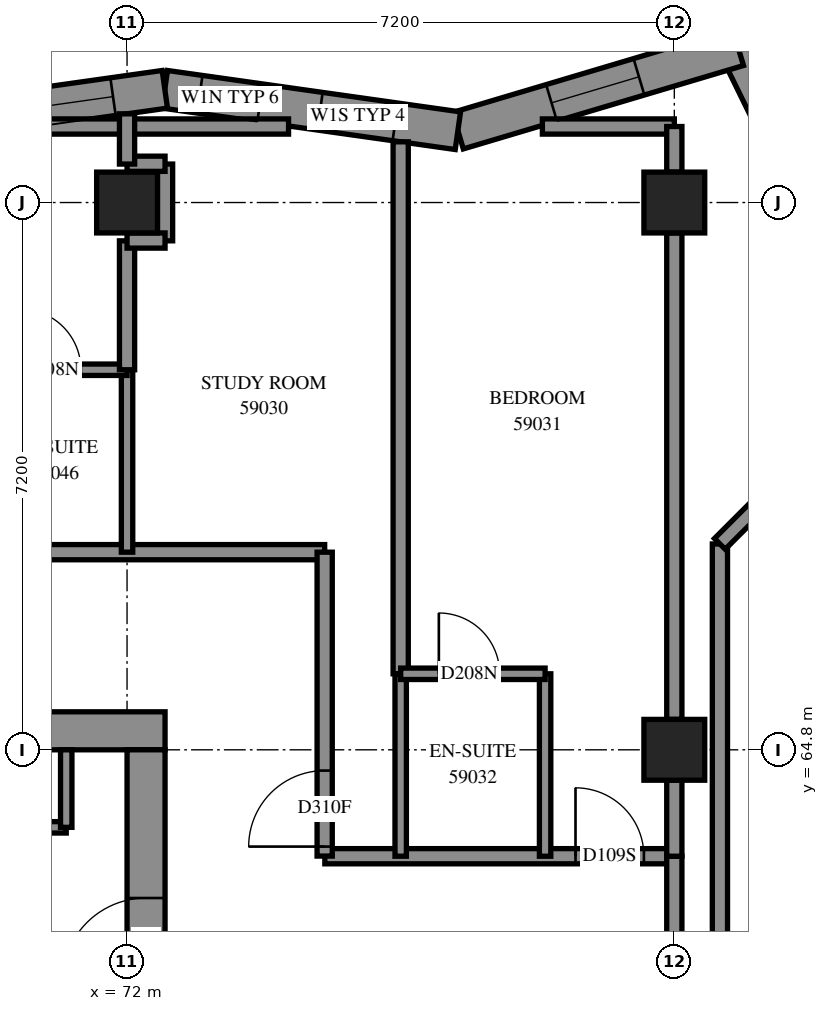
"""IFC4 building model, lengths in metres.
Left out: names, types, materials, properties, quantities, classifications, styles, units other than length and angle.
Written with IfcOpenShell. Run it as: python <this file> out.ifc"""

import sys

from ifc_helpers import new_model, si_unit, direction, frame, frame_2d, origin, origin_2d, place, context, subcontext, project, spatial, polyline, rectangle, outline, extrude, element, fill, save


model = new_model("IFC4")
c1 = context("Model", 3, precision=1e-05, world=origin(), true_north=direction((0.0, 1.0)))
c2 = subcontext(c1, "Body", "Model", "MODEL_VIEW")
j1 = project(units=[si_unit("LENGTHUNIT", "METRE"), si_unit("PLANEANGLEUNIT", "RADIAN")], contexts=[c1])
p1 = place(None, origin())
s1 = spatial("IfcSite", under=j1, at=p1, CompositionType="ELEMENT")
p2 = place(p1, origin())
s2 = spatial("IfcBuilding", under=s1, at=p2, CompositionType="ELEMENT")
p3 = place(p2, frame((0.0, 0.0, 216.8)))
s3 = spatial("IfcBuildingStorey", under=s2, at=p3, CompositionType="ELEMENT", Elevation=216.8)
for number, where, z_axis, x_axis in (
    (1, (72.0, 72.0, 0.0), (0.0, 0.0, 1.0), (1.0, 0.0, 0.0)),
    (2, (79.2, 64.8, 0.0), (0.0, 0.0, 1.0), (1.0, 0.0, 0.0)),
    (3, (79.2, 72.0, 0.0), (0.0, 0.0, 1.0), (1.0, 0.0, 0.0)),
):
    element("IfcColumn", number, at=place(p3, frame(where, z_axis=z_axis, x_axis=x_axis)), inside=s3, PredefinedType="COLUMN", context=c2, shape_type="SweptSolid", body=[
        extrude(rectangle(XDim=0.8, YDim=0.8, at=origin_2d()), origin(), (0.0, 0.0, 1.0), 3.1),
    ])
p4 = place(p3, frame((57.1, 65.05, -0.3), z_axis=(0.0, 0.0, 1.0), x_axis=(1.0, 0.0, 0.0)))
e4 = element("IfcWall", 4, at=p4, inside=s3, PredefinedType="SHEAR", context=c2, shape_type="SweptSolid", body=[
    extrude(rectangle(XDim=15.4, YDim=0.5, at=frame_2d((7.7, 0.0))), origin(), (0.0, 0.0, 1.0), 2.7),
])
p5 = place(p4, frame((10.5, 0.0, 0.3)))
e5 = element("IfcOpeningElement", 5, at=p5, cuts=e4, PredefinedType="OPENING", context=c2, shape_type="SweptSolid", body=[
    extrude(rectangle(XDim=0.8, YDim=2.1, at=frame_2d((0.4, 1.05))), frame((0.0, 0.26, 0.0), z_axis=(0.0, -1.0, 0.0), x_axis=(1.0, 0.0, 0.0)), (0.0, 0.0, 1.0), 0.52),
])
p6 = place(p3, frame((72.25, 50.4, -0.3), z_axis=(0.0, 0.0, 1.0), x_axis=(0.0, 1.0, 0.0)))
e6 = element("IfcWall", 6, at=p6, inside=s3, PredefinedType="SHEAR", context=c2, shape_type="SweptSolid", body=[
    extrude(rectangle(XDim=14.4, YDim=0.5, at=frame_2d((7.2, 0.0))), origin(), (0.0, 0.0, 1.0), 2.7),
])
p7 = place(p6, frame((4.55, 0.0, 0.3)))
e7 = element("IfcOpeningElement", 7, at=p7, cuts=e6, PredefinedType="OPENING", context=c2, shape_type="SweptSolid", body=[
    extrude(rectangle(XDim=1.1, YDim=2.1, at=frame_2d((0.55, 1.05))), frame((0.0, 0.26, 0.0), z_axis=(0.0, -1.0, 0.0), x_axis=(1.0, 0.0, 0.0)), (0.0, 0.0, 1.0), 0.52),
])
p8 = place(p6, frame((11.35, 0.0, 0.3)))
e8 = element("IfcOpeningElement", 8, at=p8, cuts=e6, PredefinedType="OPENING", context=c2, shape_type="SweptSolid", body=[
    extrude(rectangle(XDim=1.1, YDim=2.1, at=frame_2d((0.55, 1.05))), frame((0.0, 0.26, 0.0), z_axis=(0.0, -1.0, 0.0), x_axis=(1.0, 0.0, 0.0)), (0.0, 0.0, 1.0), 0.52),
])
p9 = place(p3, frame((81.525, 71.009, 0.0), z_axis=(0.0, 0.0, 1.0), x_axis=(-0.4400711052, 0.8979629293, 0.0)))
e9 = element("IfcWall", 9, at=p9, inside=s3, PredefinedType="SOLIDWALL", context=c2, shape_type="SweptSolid", body=[
    extrude(outline(polyline([(0.063, -0.25), (3.59, -0.25), (3.167, 0.25), (-0.063, 0.25), (0.063, -0.25)])), origin(), (0.0, 0.0, 1.0), 3.1),
])
p10 = place(p9, frame((0.739, 0.0, 0.45)))
e10 = element("IfcOpeningElement", 10, at=p10, cuts=e9, PredefinedType="OPENING", context=c2, shape_type="SweptSolid", body=[
    extrude(rectangle(XDim=1.2, YDim=2.5, at=frame_2d((0.6, 1.25))), frame((0.0, 0.26, 0.0), z_axis=(0.0, -1.0, 0.0), x_axis=(1.0, 0.0, 0.0)), (0.0, 0.0, 1.0), 0.52),
])
p11 = place(p3, frame((80.039, 74.042, 0.0), z_axis=(0.0, 0.0, 1.0), x_axis=(-0.9584416684, -0.2852885702, 0.0)))
e11 = element("IfcWall", 11, at=p11, inside=s3, PredefinedType="SOLIDWALL", context=c2, shape_type="SweptSolid", body=[
    extrude(outline(polyline([(-0.211, -0.25), (3.791, -0.25), (3.901, 0.25), (0.211, 0.25), (-0.211, -0.25)])), origin(), (0.0, 0.0, 1.0), 3.1),
])
p12 = place(p11, frame((1.361, 0.0, 0.45)))
e12 = element("IfcOpeningElement", 12, at=p12, cuts=e11, PredefinedType="OPENING", context=c2, shape_type="SweptSolid", body=[
    extrude(rectangle(XDim=1.2, YDim=2.5, at=frame_2d((0.6, 1.25))), frame((0.0, 0.26, 0.0), z_axis=(0.0, -1.0, 0.0), x_axis=(1.0, 0.0, 0.0)), (0.0, 0.0, 1.0), 0.52),
])
p13 = place(p3, frame((76.353, 72.945, 0.0), z_axis=(0.0, 0.0, 1.0), x_axis=(-0.9901676214, 0.139885959, 0.0)))
e13 = element("IfcWall", 13, at=p13, inside=s3, PredefinedType="SOLIDWALL", context=c2, shape_type="SweptSolid", body=[
    extrude(outline(polyline([(0.054, -0.25), (3.929, -0.25), (3.859, 0.25), (-0.054, 0.25), (0.054, -0.25)])), origin(), (0.0, 0.0, 1.0), 3.1),
])
p14 = place(p13, frame((0.832, 0.0, 0.45)))
e14 = element("IfcOpeningElement", 14, at=p14, cuts=e13, PredefinedType="OPENING", context=c2, shape_type="SweptSolid", body=[
    extrude(rectangle(XDim=1.0, YDim=2.5, at=frame_2d((0.5, 1.25))), frame((0.0, 0.26, 0.0), z_axis=(0.0, -1.0, 0.0), x_axis=(1.0, 0.0, 0.0)), (0.0, 0.0, 1.0), 0.52),
])
p15 = place(p13, frame((2.629, 0.0, 0.45)))
e15 = element("IfcOpeningElement", 15, at=p15, cuts=e13, PredefinedType="OPENING", context=c2, shape_type="SweptSolid", body=[
    extrude(rectangle(XDim=0.8, YDim=2.5, at=frame_2d((0.4, 1.25))), frame((0.0, 0.26, 0.0), z_axis=(0.0, -1.0, 0.0), x_axis=(1.0, 0.0, 0.0)), (0.0, 0.0, 1.0), 0.52),
])
p16 = place(p3, frame((72.497, 73.49, 0.0), z_axis=(0.0, 0.0, 1.0), x_axis=(-0.9901681853, -0.1398819675, 0.0)))
e16 = element("IfcWall", 16, at=p16, inside=s3, PredefinedType="SOLIDWALL", context=c2, shape_type="SweptSolid", body=[
    extrude(outline(polyline([(-0.035, -0.25), (3.839, -0.25), (3.91, 0.25), (0.035, 0.25), (-0.035, -0.25)])), origin(), (0.0, 0.0, 1.0), 3.1),
])
p17 = place(p16, frame((0.688, 0.0, 0.45)))
e17 = element("IfcOpeningElement", 17, at=p17, cuts=e16, PredefinedType="OPENING", context=c2, shape_type="SweptSolid", body=[
    extrude(rectangle(XDim=1.3, YDim=2.5, at=frame_2d((0.65, 1.25))), frame((0.0, 0.26, 0.0), z_axis=(0.0, -1.0, 0.0), x_axis=(1.0, 0.0, 0.0)), (0.0, 0.0, 1.0), 0.52),
])
p18 = place(p16, frame((2.188, 0.0, 0.45)))
e18 = element("IfcOpeningElement", 18, at=p18, cuts=e16, PredefinedType="OPENING", context=c2, shape_type="SweptSolid", body=[
    extrude(rectangle(XDim=1.3, YDim=2.5, at=frame_2d((0.65, 1.25))), frame((0.0, 0.26, 0.0), z_axis=(0.0, -1.0, 0.0), x_axis=(1.0, 0.0, 0.0)), (0.0, 0.0, 1.0), 0.52),
])
p19 = place(p3, frame((64.95, 63.78, 0.0), z_axis=(0.0, 0.0, 1.0), x_axis=(1.0, 0.0, 0.0)))
e19 = element("IfcWall", 19, at=p19, inside=s3, PredefinedType="PARTITIONING", context=c2, shape_type="SweptSolid", body=[
    extrude(rectangle(XDim=6.25, YDim=0.15, at=frame_2d((3.125, 0.0))), origin(), (0.0, 0.0, 1.0), 3.1),
])
p20 = place(p3, frame((71.2, 63.78, 0.0), z_axis=(0.0, 0.0, 1.0), x_axis=(0.0, 1.0, 0.0)))
e20 = element("IfcWall", 20, at=p20, inside=s3, PredefinedType="PARTITIONING", context=c2, shape_type="SweptSolid", body=[
    extrude(rectangle(XDim=1.02, YDim=0.15, at=frame_2d((0.51, 0.0))), origin(), (0.0, 0.0, 1.0), 3.1),
])
p21 = place(p3, frame((55.0, 67.4, 0.0), z_axis=(0.0, 0.0, 1.0), x_axis=(1.0, 0.0, 0.0)))
e21 = element("IfcWall", 21, at=p21, inside=s3, PredefinedType="PARTITIONING", context=c2, shape_type="SweptSolid", body=[
    extrude(rectangle(XDim=19.6, YDim=0.2, at=frame_2d((9.8, 0.0))), origin(), (0.0, 0.0, 1.0), 3.1),
])
p22 = place(p21, frame((4.9, 0.0, 0.0)))
e22 = element("IfcOpeningElement", 22, at=p22, cuts=e21, PredefinedType="OPENING", context=c2, shape_type="SweptSolid", body=[
    extrude(rectangle(XDim=0.9, YDim=2.1, at=frame_2d((0.45, 1.05))), frame((0.0, 0.11, 0.0), z_axis=(0.0, -1.0, 0.0), x_axis=(1.0, 0.0, 0.0)), (0.0, 0.0, 1.0), 0.22),
])
p23 = place(p21, frame((8.539, 0.0, 0.0)))
e23 = element("IfcOpeningElement", 23, at=p23, cuts=e21, PredefinedType="OPENING", context=c2, shape_type="SweptSolid", body=[
    extrude(rectangle(XDim=0.9, YDim=2.1, at=frame_2d((0.45, 1.05))), frame((0.0, 0.11, 0.0), z_axis=(0.0, -1.0, 0.0), x_axis=(1.0, 0.0, 0.0)), (0.0, 0.0, 1.0), 0.22),
])
p24 = place(p21, frame((13.8, 0.0, 0.0)))
e24 = element("IfcOpeningElement", 24, at=p24, cuts=e21, PredefinedType="OPENING", context=c2, shape_type="SweptSolid", body=[
    extrude(rectangle(XDim=0.9, YDim=2.1, at=frame_2d((0.45, 1.05))), frame((0.0, 0.11, 0.0), z_axis=(0.0, -1.0, 0.0), x_axis=(1.0, 0.0, 0.0)), (0.0, 0.0, 1.0), 0.22),
])
p25 = place(p3, frame((79.8, 55.912, 0.0), z_axis=(0.0, 0.0, 1.0), x_axis=(0.0, 1.0, 0.0)))
e25 = element("IfcWall", 25, at=p25, inside=s3, PredefinedType="PARTITIONING", context=c2, shape_type="SweptSolid", body=[
    extrude(rectangle(XDim=11.596, YDim=0.2, at=frame_2d((5.798, 0.0))), origin(), (0.0, 0.0, 1.0), 3.1),
])
p26 = place(p3, frame((79.799, 55.913, 0.0), z_axis=(0.0, 0.0, 1.0), x_axis=(0.7071067812, 0.7071067812, 0.0)))
e26 = element("IfcWall", 26, at=p26, inside=s3, PredefinedType="PARTITIONING", context=c2, shape_type="SweptSolid", body=[
    extrude(rectangle(XDim=9.95, YDim=0.2, at=frame_2d((4.975, 0.0))), origin(), (0.0, 0.0, 1.0), 3.1),
])
p27 = place(p26, frame((0.927, 0.0, 0.0)))
e27 = element("IfcOpeningElement", 27, at=p27, cuts=e26, PredefinedType="OPENING", context=c2, shape_type="SweptSolid", body=[
    extrude(rectangle(XDim=1.0, YDim=2.1, at=frame_2d((0.5, 1.05))), frame((0.0, 0.11, 0.0), z_axis=(0.0, -1.0, 0.0), x_axis=(1.0, 0.0, 0.0)), (0.0, 0.0, 1.0), 0.22),
])
p28 = place(p3, frame((75.6, 65.8, 0.0), z_axis=(0.0, 0.0, 1.0), x_axis=(0.0, 1.0, 0.0)))
e28 = element("IfcWall", 28, at=p28, inside=s3, PredefinedType="PARTITIONING", context=c2, shape_type="SweptSolid", body=[
    extrude(rectangle(XDim=6.999, YDim=0.2, at=frame_2d((3.499, 0.0))), origin(), (0.0, 0.0, 1.0), 3.1),
])
p29 = place(p3, frame((79.2, 65.2, 0.0), z_axis=(0.0, 0.0, 1.0), x_axis=(0.0, 1.0, 0.0)))
e29 = element("IfcWall", 29, at=p29, inside=s3, PredefinedType="PARTITIONING", context=c2, shape_type="SweptSolid", body=[
    extrude(rectangle(XDim=6.4, YDim=0.2, at=frame_2d((3.2, 0.0))), origin(), (0.0, 0.0, 1.0), 3.1),
])
p30 = place(p3, frame((74.602, 63.4, 0.0), z_axis=(0.0, 0.0, 1.0), x_axis=(1.0, 0.0, 0.0)))
e30 = element("IfcWall", 30, at=p30, inside=s3, PredefinedType="PARTITIONING", context=c2, shape_type="SweptSolid", body=[
    extrude(rectangle(XDim=4.598, YDim=0.2, at=frame_2d((2.299, 0.0))), origin(), (0.0, 0.0, 1.0), 3.1),
])
p31 = place(p30, frame((3.298, 0.0, 0.0)))
e31 = element("IfcOpeningElement", 31, at=p31, cuts=e30, PredefinedType="OPENING", context=c2, shape_type="SweptSolid", body=[
    extrude(rectangle(XDim=0.9, YDim=2.1, at=frame_2d((0.45, 1.05))), frame((0.0, 0.11, 0.0), z_axis=(0.0, -1.0, 0.0), x_axis=(1.0, 0.0, 0.0)), (0.0, 0.0, 1.0), 0.22),
])
p32 = place(p3, frame((74.6, 63.402, 0.0), z_axis=(0.0, 0.0, 1.0), x_axis=(0.0, 1.0, 0.0)))
e32 = element("IfcWall", 32, at=p32, inside=s3, PredefinedType="PARTITIONING", context=c2, shape_type="SweptSolid", body=[
    extrude(rectangle(XDim=3.998, YDim=0.2, at=frame_2d((1.999, 0.0))), origin(), (0.0, 0.0, 1.0), 3.1),
])
p33 = place(p32, frame((0.125, 0.0, 0.0)))
e33 = element("IfcOpeningElement", 33, at=p33, cuts=e32, PredefinedType="OPENING", context=c2, shape_type="SweptSolid", body=[
    extrude(rectangle(XDim=1.0, YDim=2.1, at=frame_2d((0.5, 1.05))), frame((0.0, 0.11, 0.0), z_axis=(0.0, -1.0, 0.0), x_axis=(1.0, 0.0, 0.0)), (0.0, 0.0, 1.0), 0.22),
])
p34 = place(p3, frame((79.799, 67.509, 0.0), z_axis=(0.0, 0.0, 1.0), x_axis=(0.707093066, 0.7071204961, 0.0)))
e34 = element("IfcWall", 34, at=p34, inside=s3, PredefinedType="PARTITIONING", context=c2, shape_type="SweptSolid", body=[
    extrude(rectangle(XDim=3.646, YDim=0.2, at=frame_2d((1.823, 0.0))), origin(), (0.0, 0.0, 1.0), 3.1),
])
p35 = place(p3, frame((70.869, 73.0, 0.0), z_axis=(0.0, 0.0, 1.0), x_axis=(1.0, 0.0, 0.0)))
e35 = element("IfcWall", 35, at=p35, inside=s3, PredefinedType="PARTITIONING", context=c2, shape_type="SweptSolid", body=[
    extrude(rectangle(XDim=3.256, YDim=0.2, at=frame_2d((1.628, 0.0))), origin(), (0.0, 0.0, 1.0), 3.1),
])
for number, where, z_axis, x_axis in (
    (36, (75.6, 63.4, 0.0), (0.0, 0.0, 1.0), (0.0, 1.0, 0.0)),
    (37, (77.5, 63.4, 0.0), (0.0, 0.0, 1.0), (0.0, 1.0, 0.0)),
    (38, (72.0, 67.4, 0.0), (0.0, 0.0, 1.0), (0.0, 1.0, 0.0)),
):
    element("IfcWall", number, at=place(p3, frame(where, z_axis=z_axis, x_axis=x_axis)), inside=s3, PredefinedType="PARTITIONING", context=c2, shape_type="SweptSolid", body=[
        extrude(rectangle(XDim=2.4, YDim=0.15, at=frame_2d((1.2, 0.0))), origin(), (0.0, 0.0, 1.0), 3.1),
    ])
p36 = place(p3, frame((79.2, 61.4, 0.0), z_axis=(0.0, 0.0, 1.0), x_axis=(0.0, 1.0, 0.0)))
e39 = element("IfcWall", 39, at=p36, inside=s3, PredefinedType="PARTITIONING", context=c2, shape_type="SweptSolid", body=[
    extrude(rectangle(XDim=2.0, YDim=0.2, at=frame_2d((1.0, 0.0))), origin(), (0.0, 0.0, 1.0), 3.1),
])
p37 = place(p3, frame((75.6, 65.8, 0.0), z_axis=(0.0, 0.0, 1.0), x_axis=(1.0, 0.0, 0.0)))
e40 = element("IfcWall", 40, at=p37, inside=s3, PredefinedType="PARTITIONING", context=c2, shape_type="SweptSolid", body=[
    extrude(rectangle(XDim=1.9, YDim=0.15, at=frame_2d((0.95, 0.0))), origin(), (0.0, 0.0, 1.0), 3.1),
])
p38 = place(p37, frame((0.502, 0.0, 0.0)))
e41 = element("IfcOpeningElement", 41, at=p38, cuts=e40, PredefinedType="OPENING", context=c2, shape_type="SweptSolid", body=[
    extrude(rectangle(XDim=0.8, YDim=2.1, at=frame_2d((0.4, 1.05))), frame((0.0, 0.085, 0.0), z_axis=(0.0, -1.0, 0.0), x_axis=(1.0, 0.0, 0.0)), (0.0, 0.0, 1.0), 0.17),
])
p39 = place(p3, frame((70.1, 69.8, 0.0), z_axis=(0.0, 0.0, 1.0), x_axis=(1.0, 0.0, 0.0)))
e42 = element("IfcWall", 42, at=p39, inside=s3, PredefinedType="PARTITIONING", context=c2, shape_type="SweptSolid", body=[
    extrude(rectangle(XDim=1.9, YDim=0.15, at=frame_2d((0.95, 0.0))), origin(), (0.0, 0.0, 1.0), 3.1),
])
p40 = place(p39, frame((0.493, 0.0, 0.0)))
e43 = element("IfcOpeningElement", 43, at=p40, cuts=e42, PredefinedType="OPENING", context=c2, shape_type="SweptSolid", body=[
    extrude(rectangle(XDim=0.8, YDim=2.1, at=frame_2d((0.4, 1.05))), frame((0.0, 0.085, 0.0), z_axis=(0.0, -1.0, 0.0), x_axis=(1.0, 0.0, 0.0)), (0.0, 0.0, 1.0), 0.17),
])
p41 = place(p3, frame((77.464, 73.0, 0.0), z_axis=(0.0, 0.0, 1.0), x_axis=(1.0, 0.0, 0.0)))
e44 = element("IfcWall", 44, at=p41, inside=s3, PredefinedType="PARTITIONING", context=c2, shape_type="SweptSolid", body=[
    extrude(rectangle(XDim=1.736, YDim=0.2, at=frame_2d((0.868, 0.0))), origin(), (0.0, 0.0, 1.0), 3.1),
])
p42 = place(p3, frame((72.0, 69.8, 0.0), z_axis=(0.0, 0.0, 1.0), x_axis=(0.0, 1.0, 0.0)))
e45 = element("IfcWall", 45, at=p42, inside=s3, PredefinedType="PARTITIONING", context=c2, shape_type="SweptSolid", body=[
    extrude(rectangle(XDim=1.696, YDim=0.2, at=frame_2d((0.848, 0.0))), origin(), (0.0, 0.0, 1.0), 3.1),
])
p43 = place(p3, frame((72.5, 71.496, 0.0), z_axis=(0.0, 0.0, 1.0), x_axis=(0.0, 1.0, 0.0)))
e46 = element("IfcWall", 46, at=p43, inside=s3, PredefinedType="PARTITIONING", context=c2, shape_type="SweptSolid", body=[
    extrude(rectangle(XDim=1.01, YDim=0.2, at=frame_2d((0.505, 0.0))), origin(), (0.0, 0.0, 1.0), 3.1),
])
p44 = place(p3, frame((79.2, 63.4, 0.0), z_axis=(0.0, 0.0, 1.0), x_axis=(0.0, 1.0, 0.0)))
e47 = element("IfcWall", 47, at=p44, inside=s3, PredefinedType="PARTITIONING", context=c2, shape_type="SweptSolid", body=[
    extrude(rectangle(XDim=1.0, YDim=0.2, at=frame_2d((0.5, 0.0))), origin(), (0.0, 0.0, 1.0), 3.1),
])
p45 = place(p3, frame((79.2, 72.4, 0.0), z_axis=(0.0, 0.0, 1.0), x_axis=(0.0, 1.0, 0.0)))
e48 = element("IfcWall", 48, at=p45, inside=s3, PredefinedType="PARTITIONING", context=c2, shape_type="SweptSolid", body=[
    extrude(rectangle(XDim=0.6, YDim=0.2, at=frame_2d((0.3, 0.0))), origin(), (0.0, 0.0, 1.0), 3.1),
])
for number, where, z_axis, x_axis in (
    (49, (72.0, 71.5, 0.0), (0.0, 0.0, 1.0), (1.0, 0.0, 0.0)),
    (50, (72.0, 72.51, 0.0), (0.0, 0.0, 1.0), (1.0, 0.0, 0.0)),
):
    element("IfcWall", number, at=place(p3, frame(where, z_axis=z_axis, x_axis=x_axis)), inside=s3, PredefinedType="PARTITIONING", context=c2, shape_type="SweptSolid", body=[
        extrude(rectangle(XDim=0.5, YDim=0.2, at=frame_2d((0.25, 0.0))), origin(), (0.0, 0.0, 1.0), 3.1),
    ])
p46 = place(p3, frame((72.0, 72.506, 0.0), z_axis=(0.0, 0.0, 1.0), x_axis=(0.0, 1.0, 0.0)))
e51 = element("IfcWall", 51, at=p46, inside=s3, PredefinedType="PARTITIONING", context=c2, shape_type="SweptSolid", body=[
    extrude(rectangle(XDim=0.661, YDim=0.2, at=frame_2d((0.33, 0.0))), origin(), (0.0, 0.0, 1.0), 3.1),
])
p47 = place(p12, origin())
e52 = element("IfcWindow", 52, at=p47, inside=s3, PartitioningType="SINGLE_PANEL", PredefinedType="WINDOW", context=c2, shape_type="SweptSolid", body=[
    extrude(rectangle(XDim=1.2, YDim=2.5, at=frame_2d((0.6, 1.25))), frame((0.0, 0.18, 0.0), z_axis=(0.0, -1.0, 0.0), x_axis=(1.0, 0.0, 0.0)), (0.0, 0.0, 1.0), 0.06),
])
fill(e12, e52)
p48 = place(p17, origin())
e53 = element("IfcWindow", 53, at=p48, inside=s3, PartitioningType="SINGLE_PANEL", PredefinedType="WINDOW", context=c2, shape_type="SweptSolid", body=[
    extrude(rectangle(XDim=1.3, YDim=2.5, at=frame_2d((0.65, 1.25))), frame((0.0, 0.12, 0.0), z_axis=(0.0, -1.0, 0.0), x_axis=(1.0, 0.0, 0.0)), (0.0, 0.0, 1.0), 0.06),
])
fill(e17, e53)
p49 = place(p8, origin())
e54 = element("IfcDoor", 54, at=p49, inside=s3, OperationType="SINGLE_SWING_RIGHT", PredefinedType="DOOR", context=c2, shape_type="SweptSolid", body=[
    extrude(rectangle(XDim=1.1, YDim=2.1, at=frame_2d((0.55, 1.05))), frame((0.0, 0.025, 0.0), z_axis=(0.0, -1.0, 0.0), x_axis=(1.0, 0.0, 0.0)), (0.0, 0.0, 1.0), 0.05),
])
fill(e8, e54)
p50 = place(p33, origin())
e55 = element("IfcDoor", 55, at=p50, inside=s3, OperationType="SINGLE_SWING_RIGHT", PredefinedType="DOOR", context=c2, shape_type="SweptSolid", body=[
    extrude(rectangle(XDim=1.0, YDim=2.1, at=frame_2d((0.5, 1.05))), frame((0.0, 0.025, 0.0), z_axis=(0.0, -1.0, 0.0), x_axis=(1.0, 0.0, 0.0)), (0.0, 0.0, 1.0), 0.05),
])
fill(e33, e55)
p51 = place(p31, origin())
e56 = element("IfcDoor", 56, at=p51, inside=s3, OperationType="SINGLE_SWING_LEFT", PredefinedType="DOOR", context=c2, shape_type="SweptSolid", body=[
    extrude(rectangle(XDim=0.9, YDim=2.1, at=frame_2d((0.45, 1.05))), frame((0.0, 0.025, 0.0), z_axis=(0.0, -1.0, 0.0), x_axis=(1.0, 0.0, 0.0)), (0.0, 0.0, 1.0), 0.05),
])
fill(e31, e56)
p52 = place(p38, origin())
e57 = element("IfcDoor", 57, at=p52, inside=s3, OperationType="SINGLE_SWING_RIGHT", PredefinedType="DOOR", context=c2, shape_type="SweptSolid", body=[
    extrude(rectangle(XDim=0.8, YDim=2.1, at=frame_2d((0.4, 1.05))), frame((0.0, 0.025, 0.0), z_axis=(0.0, -1.0, 0.0), x_axis=(1.0, 0.0, 0.0)), (0.0, 0.0, 1.0), 0.05),
])
fill(e41, e57)
p53 = place(p40, origin())
e58 = element("IfcDoor", 58, at=p53, inside=s3, OperationType="SINGLE_SWING_RIGHT", PredefinedType="DOOR", context=c2, shape_type="SweptSolid", body=[
    extrude(rectangle(XDim=0.8, YDim=2.1, at=frame_2d((0.4, 1.05))), frame((0.0, 0.025, 0.0), z_axis=(0.0, -1.0, 0.0), x_axis=(1.0, 0.0, 0.0)), (0.0, 0.0, 1.0), 0.05),
])
fill(e43, e58)
p54 = place(p14, origin())
e59 = element("IfcWindow", 59, at=p54, inside=s3, PartitioningType="SINGLE_PANEL", PredefinedType="WINDOW", context=c2, shape_type="SweptSolid", body=[
    extrude(rectangle(XDim=1.0, YDim=2.5, at=frame_2d((0.5, 1.25))), frame((0.0, 0.18, 0.0), z_axis=(0.0, -1.0, 0.0), x_axis=(1.0, 0.0, 0.0)), (0.0, 0.0, 1.0), 0.06),
])
fill(e14, e59)
p55 = place(p15, origin())
e60 = element("IfcWindow", 60, at=p55, inside=s3, PartitioningType="SINGLE_PANEL", PredefinedType="WINDOW", context=c2, shape_type="SweptSolid", body=[
    extrude(rectangle(XDim=0.8, YDim=2.5, at=frame_2d((0.4, 1.25))), frame((0.0, 0.18, 0.0), z_axis=(0.0, -1.0, 0.0), x_axis=(1.0, 0.0, 0.0)), (0.0, 0.0, 1.0), 0.06),
])
fill(e15, e60)
save(model, sys.argv[1])
